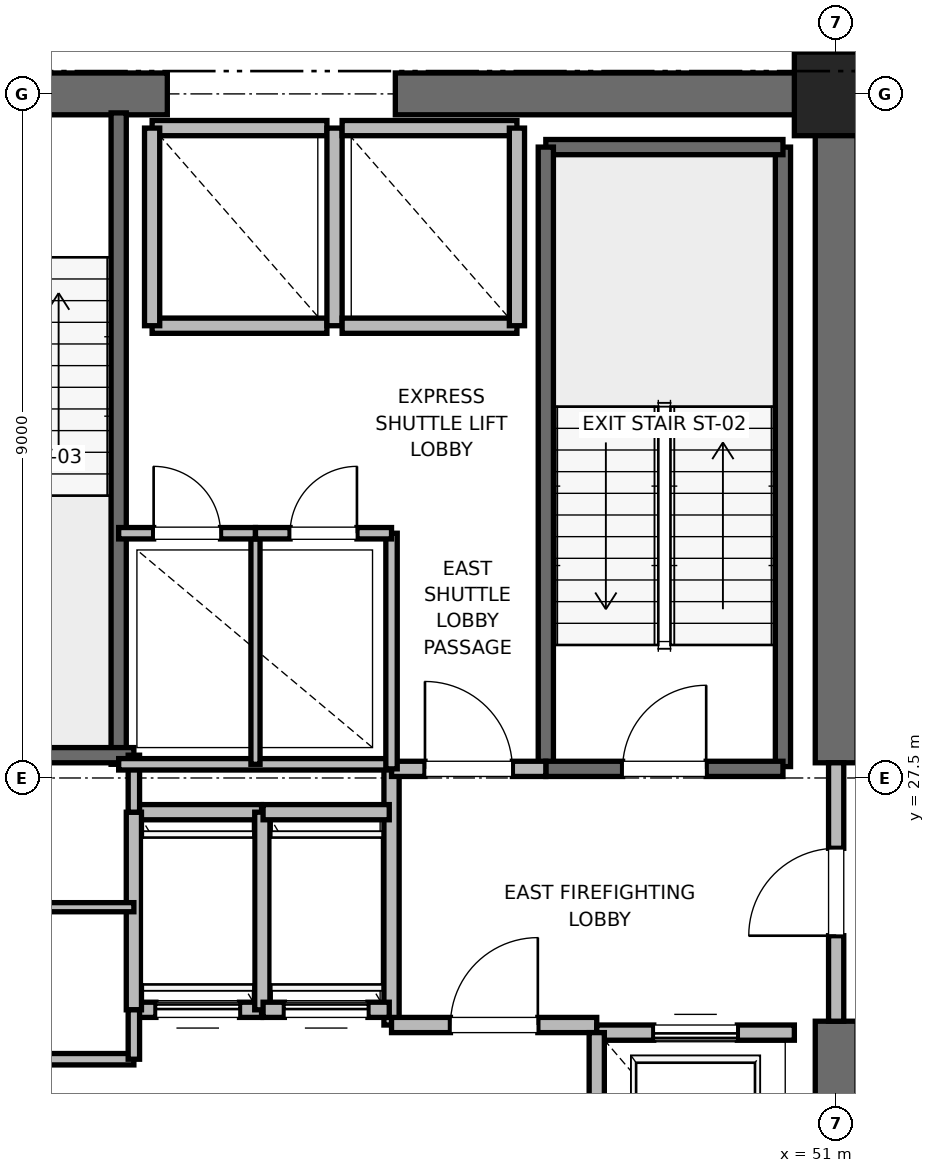
"""IFC4 building model, lengths in metres.
Left out: names, types, materials, properties, quantities, classifications, styles, units other than length and angle.
Written with IfcOpenShell. Run it as: python <this file> out.ifc"""

import sys

from ifc_helpers import new_model, si_unit, direction, frame, frame_2d, origin, origin_2d, place, context, subcontext, project, spatial, rectangle, extrude, element, fill, save


model = new_model("IFC4")
c1 = context("Model", 3, precision=1e-05, world=origin(), true_north=direction((0.0, 1.0)))
c2 = subcontext(c1, "Body", "Model", "MODEL_VIEW")
j1 = project(units=[si_unit("LENGTHUNIT", "METRE"), si_unit("PLANEANGLEUNIT", "RADIAN")], contexts=[c1])
p1 = place(None, origin())
s1 = spatial("IfcSite", under=j1, at=p1, CompositionType="ELEMENT")
p2 = place(p1, origin())
s2 = spatial("IfcBuilding", under=s1, at=p2, CompositionType="ELEMENT")
p3 = place(p2, frame((0.0, 0.0, 180.4)))
s3 = spatial("IfcBuildingStorey", under=s2, at=p3, CompositionType="ELEMENT", Elevation=180.4)
p4 = place(p3, frame((51.0, 36.5, 0.0), z_axis=(0.0, 0.0, 1.0), x_axis=(1.0, 0.0, 0.0)))
e1 = element("IfcColumn", 1, at=p4, inside=s3, PredefinedType="PILASTER", context=c2, shape_type="SweptSolid", body=[
    extrude(rectangle(XDim=1.1, YDim=1.1, at=origin_2d()), origin(), (0.0, 0.0, 1.0), 4.0),
])
p5 = place(p3, frame((37.8, 36.5, 0.0), z_axis=(0.0, 0.0, 1.0), x_axis=(1.0, 0.0, 0.0)))
e2 = element("IfcWall", 2, at=p5, inside=s3, PredefinedType="SHEAR", context=c2, shape_type="SweptSolid", body=[
    extrude(rectangle(XDim=4.4, YDim=0.55, at=frame_2d((2.2, 0.0))), origin(), (0.0, 0.0, 1.0), 3.7),
])
p6 = place(p5, frame((1.65, 0.0, 0.0)))
e3 = element("IfcOpeningElement", 3, at=p6, cuts=e2, PredefinedType="OPENING", context=c2, shape_type="SweptSolid", body=[
    extrude(rectangle(XDim=1.1, YDim=2.15, at=frame_2d((0.55, 1.075))), frame((0.0, 0.275, 0.0), z_axis=(0.0, -1.0, 0.0), x_axis=(1.0, 0.0, 0.0)), (0.0, 0.0, 1.0), 0.55),
])
for number, where, z_axis, x_axis in (
    (4, (45.2, 36.5, 0.0), (0.0, 0.0, 1.0), (1.0, 0.0, 0.0)),
    (5, (51.0, 18.5, 0.0), (0.0, 0.0, 1.0), (0.0, 1.0, 0.0)),
):
    element("IfcWall", number, at=place(p3, frame(where, z_axis=z_axis, x_axis=x_axis)), inside=s3, PredefinedType="SHEAR", context=c2, shape_type="SweptSolid", body=[
        extrude(rectangle(XDim=5.8, YDim=0.55, at=frame_2d((2.9, 0.0))), origin(), (0.0, 0.0, 1.0), 3.7),
    ])
p7 = place(p3, frame((51.0, 27.7, 0.0), z_axis=(0.0, 0.0, 1.0), x_axis=(0.0, 1.0, 0.0)))
e6 = element("IfcWall", 6, at=p7, inside=s3, PredefinedType="SHEAR", context=c2, shape_type="SweptSolid", body=[
    extrude(rectangle(XDim=8.8, YDim=0.55, at=frame_2d((4.4, 0.0))), origin(), (0.0, 0.0, 1.0), 3.7),
])
p8 = place(p3, frame((50.3, 27.65, 0.0), z_axis=(0.0, 0.0, 1.0), x_axis=(0.0, 1.0, 0.0)))
e7 = element("IfcWall", 7, at=p8, inside=s3, PredefinedType="SOLIDWALL", context=c2, shape_type="SweptSolid", body=[
    extrude(rectangle(XDim=8.15, YDim=0.2, at=frame_2d((4.075, 0.0))), origin(), (0.0, 0.0, 1.0), 3.7),
])
p9 = place(p3, frame((47.18, 35.8, 0.0), z_axis=(0.0, 0.0, 1.0), x_axis=(1.0, 0.0, 0.0)))
e8 = element("IfcWall", 8, at=p9, inside=s3, PredefinedType="SOLIDWALL", context=c2, shape_type="SweptSolid", body=[
    extrude(rectangle(XDim=3.12, YDim=0.2, at=frame_2d((1.56, 0.0))), origin(), (0.0, 0.0, 1.0), 3.7),
])
p10 = place(p3, frame((47.18, 27.62, 0.0), z_axis=(0.0, 0.0, 1.0), x_axis=(0.0, 1.0, 0.0)))
e9 = element("IfcWall", 9, at=p10, inside=s3, PredefinedType="SOLIDWALL", context=c2, shape_type="SweptSolid", body=[
    extrude(rectangle(XDim=8.18, YDim=0.2, at=frame_2d((4.09, 0.0))), origin(), (0.0, 0.0, 1.0), 3.7),
])
p11 = place(p3, frame((47.18, 27.62, 0.0), z_axis=(0.0, 0.0, 1.0), x_axis=(1.0, 0.0, 0.0)))
e10 = element("IfcWall", 10, at=p11, inside=s3, PredefinedType="SOLIDWALL", context=c2, shape_type="SweptSolid", body=[
    extrude(rectangle(XDim=3.12, YDim=0.2, at=frame_2d((1.56, 0.0))), origin(), (0.0, 0.0, 1.0), 3.7),
])
p12 = place(p11, frame((1.01, 0.0, 0.0)))
e11 = element("IfcOpeningElement", 11, at=p12, cuts=e10, PredefinedType="OPENING", context=c2, shape_type="SweptSolid", body=[
    extrude(rectangle(XDim=1.1, YDim=2.15, at=frame_2d((0.55, 1.075))), frame((0.0, 0.1, 0.0), z_axis=(0.0, -1.0, 0.0), x_axis=(1.0, 0.0, 0.0)), (0.0, 0.0, 1.0), 0.2),
])
p13 = place(p3, frame((41.56, 27.68, 0.0), z_axis=(0.0, 0.0, 1.0), x_axis=(0.0, 1.0, 0.0)))
e12 = element("IfcWall", 12, at=p13, inside=s3, PredefinedType="SOLIDWALL", context=c2, shape_type="SweptSolid", body=[
    extrude(rectangle(XDim=8.57, YDim=0.2, at=frame_2d((4.285, 0.0))), origin(), (0.0, 0.0, 1.0), 3.7),
])
p14 = place(p3, frame((38.44, 27.8, 0.0), z_axis=(0.0, 0.0, 1.0), x_axis=(1.0, 0.0, 0.0)))
e13 = element("IfcWall", 13, at=p14, inside=s3, PredefinedType="SOLIDWALL", context=c2, shape_type="SweptSolid", body=[
    extrude(rectangle(XDim=3.32, YDim=0.2, at=frame_2d((1.66, 0.0))), origin(), (0.0, 0.0, 1.0), 3.7),
])
p15 = place(p3, frame((45.15, 24.25, 0.0), z_axis=(0.0, 0.0, 1.0), x_axis=(0.0, 1.0, 0.0)))
e14 = element("IfcWall", 14, at=p15, inside=s3, PredefinedType="PARTITIONING", context=c2, shape_type="SweptSolid", body=[
    extrude(rectangle(XDim=3.37, YDim=0.2, at=frame_2d((1.685, 0.0))), origin(), (0.0, 0.0, 1.0), 3.7),
])
p16 = place(p3, frame((45.15, 24.25, 0.0), z_axis=(0.0, 0.0, 1.0), x_axis=(1.0, 0.0, 0.0)))
e15 = element("IfcWall", 15, at=p16, inside=s3, PredefinedType="PARTITIONING", context=c2, shape_type="SweptSolid", body=[
    extrude(rectangle(XDim=2.7, YDim=0.2, at=frame_2d((1.35, 0.0))), origin(), (0.0, 0.0, 1.0), 3.7),
])
p17 = place(p16, frame((0.775, 0.0, 0.0)))
e16 = element("IfcOpeningElement", 16, at=p17, cuts=e15, PredefinedType="OPENING", context=c2, shape_type="SweptSolid", body=[
    extrude(rectangle(XDim=1.15, YDim=2.2, at=frame_2d((0.575, 1.1))), frame((0.0, 0.1, 0.0), z_axis=(0.0, -1.0, 0.0), x_axis=(1.0, 0.0, 0.0)), (0.0, 0.0, 1.0), 0.2),
])
p18 = place(p3, frame((45.15, 27.62, 0.0), z_axis=(0.0, 0.0, 1.0), x_axis=(1.0, 0.0, 0.0)))
e17 = element("IfcWall", 17, at=p18, inside=s3, PredefinedType="PARTITIONING", context=c2, shape_type="SweptSolid", body=[
    extrude(rectangle(XDim=2.03, YDim=0.2, at=frame_2d((1.015, 0.0))), origin(), (0.0, 0.0, 1.0), 3.7),
])
p19 = place(p18, frame((0.44, 0.0, 0.0)))
e18 = element("IfcOpeningElement", 18, at=p19, cuts=e17, PredefinedType="OPENING", context=c2, shape_type="SweptSolid", body=[
    extrude(rectangle(XDim=1.15, YDim=2.2, at=frame_2d((0.575, 1.1))), frame((0.0, 0.1, 0.0), z_axis=(0.0, -1.0, 0.0), x_axis=(1.0, 0.0, 0.0)), (0.0, 0.0, 1.0), 0.2),
])
p20 = place(p3, frame((51.0, 24.3, 0.0), z_axis=(0.0, 0.0, 1.0), x_axis=(0.0, 1.0, 0.0)))
e19 = element("IfcWall", 19, at=p20, inside=s3, PredefinedType="PARTITIONING", context=c2, shape_type="SweptSolid", body=[
    extrude(rectangle(XDim=3.4, YDim=0.2, at=frame_2d((1.7, 0.0))), origin(), (0.0, 0.0, 1.0), 2.68),
])
p21 = place(p20, frame((1.125, 0.0, 0.0)))
e20 = element("IfcOpeningElement", 20, at=p21, cuts=e19, PredefinedType="OPENING", context=c2, shape_type="SweptSolid", body=[
    extrude(rectangle(XDim=1.15, YDim=2.2, at=frame_2d((0.575, 1.1))), frame((0.0, 0.1, 0.0), z_axis=(0.0, -1.0, 0.0), x_axis=(1.0, 0.0, 0.0)), (0.0, 0.0, 1.0), 0.2),
])
p22 = place(p3, frame((50.45, 24.15, 0.0), z_axis=(0.0, 0.0, 1.0), x_axis=(-1.0, 0.0, 0.0)))
e21 = element("IfcWall", 21, at=p22, inside=s3, PredefinedType="SOLIDWALL", context=c2, shape_type="SweptSolid", body=[
    extrude(rectangle(XDim=2.6, YDim=0.2, at=frame_2d((1.3, 0.0))), origin(), (0.0, 0.0, 1.0), 2.68),
])
p23 = place(p22, frame((0.75, 0.0, 0.0)))
e22 = element("IfcOpeningElement", 22, at=p23, cuts=e21, PredefinedType="OPENING", context=c2, shape_type="SweptSolid", body=[
    extrude(rectangle(XDim=1.1, YDim=2.2, at=frame_2d((0.55, 1.1))), frame((0.0, 0.1, 0.0), z_axis=(0.0, -1.0, 0.0), x_axis=(1.0, 0.0, 0.0)), (0.0, 0.0, 1.0), 0.2),
])
p24 = place(p3, frame((47.85, 24.15, 0.0), z_axis=(0.0, 0.0, 1.0), x_axis=(0.0, -1.0, 0.0)))
e23 = element("IfcWall", 23, at=p24, inside=s3, PredefinedType="SOLIDWALL", context=c2, shape_type="SweptSolid", body=[
    extrude(rectangle(XDim=3.0, YDim=0.2, at=frame_2d((1.5, 0.0))), origin(), (0.0, 0.0, 1.0), 3.7),
])
p25 = place(p3, frame((41.76, 24.45, 0.0), z_axis=(0.0, 0.0, 1.0), x_axis=(1.0, 0.0, 0.0)))
e24 = element("IfcWall", 24, at=p25, inside=s3, PredefinedType="SOLIDWALL", context=c2, shape_type="SweptSolid", body=[
    extrude(rectangle(XDim=1.68, YDim=0.2, at=frame_2d((0.84, 0.0))), origin(), (0.0, 0.0, 1.0), 3.7),
])
p26 = place(p25, frame((0.29, 0.0, 0.0)))
e25 = element("IfcOpeningElement", 25, at=p26, cuts=e24, PredefinedType="OPENING", context=c2, shape_type="SweptSolid", body=[
    extrude(rectangle(XDim=1.1, YDim=2.2, at=frame_2d((0.55, 1.1))), frame((0.0, 0.1, 0.0), z_axis=(0.0, -1.0, 0.0), x_axis=(1.0, 0.0, 0.0)), (0.0, 0.0, 1.0), 0.2),
])
p27 = place(p3, frame((43.44, 27.05, 0.0), z_axis=(0.0, 0.0, 1.0), x_axis=(-1.0, 0.0, 0.0)))
e26 = element("IfcWall", 26, at=p27, inside=s3, PredefinedType="SOLIDWALL", context=c2, shape_type="SweptSolid", body=[
    extrude(rectangle(XDim=1.68, YDim=0.2, at=frame_2d((0.84, 0.0))), origin(), (0.0, 0.0, 1.0), 3.7),
])
for number, where, z_axis, x_axis in (
    (27, (41.76, 27.05, 0.0), (0.0, 0.0, 1.0), (0.0, -1.0, 0.0)),
    (28, (43.45, 24.45, 0.0), (0.0, 0.0, 1.0), (0.0, 1.0, 0.0)),
):
    element("IfcWall", number, at=place(p3, frame(where, z_axis=z_axis, x_axis=x_axis)), inside=s3, PredefinedType="SOLIDWALL", context=c2, shape_type="SweptSolid", body=[
        extrude(rectangle(XDim=2.6, YDim=0.2, at=frame_2d((1.3, 0.0))), origin(), (0.0, 0.0, 1.0), 3.7),
    ])
p28 = place(p3, frame((43.46, 24.45, 0.0), z_axis=(0.0, 0.0, 1.0), x_axis=(1.0, 0.0, 0.0)))
e29 = element("IfcWall", 29, at=p28, inside=s3, PredefinedType="SOLIDWALL", context=c2, shape_type="SweptSolid", body=[
    extrude(rectangle(XDim=1.66, YDim=0.2, at=frame_2d((0.83, 0.0))), origin(), (0.0, 0.0, 1.0), 3.7),
])
p29 = place(p28, frame((0.28, 0.0, 0.0)))
e30 = element("IfcOpeningElement", 30, at=p29, cuts=e29, PredefinedType="OPENING", context=c2, shape_type="SweptSolid", body=[
    extrude(rectangle(XDim=1.1, YDim=2.2, at=frame_2d((0.55, 1.1))), frame((0.0, 0.1, 0.0), z_axis=(0.0, -1.0, 0.0), x_axis=(1.0, 0.0, 0.0)), (0.0, 0.0, 1.0), 0.2),
])
p30 = place(p3, frame((45.12, 27.05, 0.0), z_axis=(0.0, 0.0, 1.0), x_axis=(-1.0, 0.0, 0.0)))
e31 = element("IfcWall", 31, at=p30, inside=s3, PredefinedType="SOLIDWALL", context=c2, shape_type="SweptSolid", body=[
    extrude(rectangle(XDim=1.66, YDim=0.2, at=frame_2d((0.83, 0.0))), origin(), (0.0, 0.0, 1.0), 3.7),
])
p31 = place(p3, frame((42.0, 33.45, 0.0), z_axis=(0.0, 0.0, 1.0), x_axis=(1.0, 0.0, 0.0)))
e32 = element("IfcWall", 32, at=p31, inside=s3, PredefinedType="SOLIDWALL", context=c2, shape_type="SweptSolid", body=[
    extrude(rectangle(XDim=2.3, YDim=0.2, at=frame_2d((1.15, 0.0))), origin(), (0.0, 0.0, 1.0), 3.7),
])
p32 = place(p3, frame((44.3, 36.05, 0.0), z_axis=(0.0, 0.0, 1.0), x_axis=(-1.0, 0.0, 0.0)))
e33 = element("IfcWall", 33, at=p32, inside=s3, PredefinedType="SOLIDWALL", context=c2, shape_type="SweptSolid", body=[
    extrude(rectangle(XDim=2.3, YDim=0.2, at=frame_2d((1.15, 0.0))), origin(), (0.0, 0.0, 1.0), 2.68),
])
for number, where, z_axis, x_axis in (
    (34, (42.0, 36.05, 0.0), (0.0, 0.0, 1.0), (0.0, -1.0, 0.0)),
    (35, (44.4, 33.45, 0.0), (0.0, 0.0, 1.0), (0.0, 1.0, 0.0)),
):
    element("IfcWall", number, at=place(p3, frame(where, z_axis=z_axis, x_axis=x_axis)), inside=s3, PredefinedType="SOLIDWALL", context=c2, shape_type="SweptSolid", body=[
        extrude(rectangle(XDim=2.6, YDim=0.2, at=frame_2d((1.3, 0.0))), origin(), (0.0, 0.0, 1.0), 2.68),
    ])
p33 = place(p3, frame((44.5, 33.45, 0.0), z_axis=(0.0, 0.0, 1.0), x_axis=(1.0, 0.0, 0.0)))
e36 = element("IfcWall", 36, at=p33, inside=s3, PredefinedType="SOLIDWALL", context=c2, shape_type="SweptSolid", body=[
    extrude(rectangle(XDim=2.3, YDim=0.2, at=frame_2d((1.15, 0.0))), origin(), (0.0, 0.0, 1.0), 3.7),
])
p34 = place(p3, frame((46.8, 36.05, 0.0), z_axis=(0.0, 0.0, 1.0), x_axis=(-1.0, 0.0, 0.0)))
e37 = element("IfcWall", 37, at=p34, inside=s3, PredefinedType="SOLIDWALL", context=c2, shape_type="SweptSolid", body=[
    extrude(rectangle(XDim=2.3, YDim=0.2, at=frame_2d((1.15, 0.0))), origin(), (0.0, 0.0, 1.0), 2.68),
])
p35 = place(p3, frame((46.8, 33.45, 0.0), z_axis=(0.0, 0.0, 1.0), x_axis=(0.0, 1.0, 0.0)))
e38 = element("IfcWall", 38, at=p35, inside=s3, PredefinedType="SOLIDWALL", context=c2, shape_type="SweptSolid", body=[
    extrude(rectangle(XDim=2.6, YDim=0.2, at=frame_2d((1.3, 0.0))), origin(), (0.0, 0.0, 1.0), 3.7),
])
p36 = place(p3, frame((39.95, 23.8, 0.0), z_axis=(0.0, 0.0, 1.0), x_axis=(1.0, 0.0, 0.0)))
e39 = element("IfcWall", 39, at=p36, inside=s3, PredefinedType="PARTITIONING", context=c2, shape_type="SweptSolid", body=[
    extrude(rectangle(XDim=1.81, YDim=0.15, at=frame_2d((0.905, 0.0))), origin(), (0.0, 0.0, 1.0), 2.85),
])
p37 = place(p3, frame((39.95, 25.8, 0.0), z_axis=(0.0, 0.0, 1.0), x_axis=(1.0, 0.0, 0.0)))
e40 = element("IfcWall", 40, at=p37, inside=s3, PredefinedType="PARTITIONING", context=c2, shape_type="SweptSolid", body=[
    extrude(rectangle(XDim=1.81, YDim=0.12, at=frame_2d((0.905, 0.0))), origin(), (0.0, 0.0, 1.0), 2.85),
])
p38 = place(p3, frame((41.76, 23.8, 0.0), z_axis=(0.0, 0.0, 1.0), x_axis=(0.0, 1.0, 0.0)))
e41 = element("IfcWall", 41, at=p38, inside=s3, PredefinedType="PARTITIONING", context=c2, shape_type="SweptSolid", body=[
    extrude(rectangle(XDim=0.65, YDim=0.15, at=frame_2d((0.325, 0.0))), origin(), (0.0, 0.0, 1.0), 2.85),
])
p39 = place(p3, frame((41.76, 27.05, 0.0), z_axis=(0.0, 0.0, 1.0), x_axis=(0.0, 1.0, 0.0)))
e42 = element("IfcWall", 42, at=p39, inside=s3, PredefinedType="PARTITIONING", context=c2, shape_type="SweptSolid", body=[
    extrude(rectangle(XDim=0.75, YDim=0.15, at=frame_2d((0.375, 0.0))), origin(), (0.0, 0.0, 1.0), 2.85),
])
p40 = place(p3, frame((41.56, 27.68, 0.0), z_axis=(0.0, 0.0, 1.0), x_axis=(1.0, 0.0, 0.0)))
e43 = element("IfcWall", 43, at=p40, inside=s3, PredefinedType="PARTITIONING", context=c2, shape_type="SweptSolid", body=[
    extrude(rectangle(XDim=3.59, YDim=0.15, at=frame_2d((1.795, 0.0))), origin(), (0.0, 0.0, 1.0), 2.85),
])
p41 = place(p3, frame((45.15, 27.62, 0.0), z_axis=(0.0, 0.0, 1.0), x_axis=(0.0, 1.0, 0.0)))
e44 = element("IfcWall", 44, at=p41, inside=s3, PredefinedType="PARTITIONING", context=c2, shape_type="SweptSolid", body=[
    extrude(rectangle(XDim=3.1, YDim=0.15, at=frame_2d((1.55, 0.0))), origin(), (0.0, 0.0, 1.0), 2.85),
])
p42 = place(p3, frame((43.36, 27.68, 0.0), z_axis=(0.0, 0.0, 1.0), x_axis=(0.0, 1.0, 0.0)))
e45 = element("IfcWall", 45, at=p42, inside=s3, PredefinedType="PARTITIONING", context=c2, shape_type="SweptSolid", body=[
    extrude(rectangle(XDim=3.04, YDim=0.12, at=frame_2d((1.52, 0.0))), origin(), (0.0, 0.0, 1.0), 2.85),
])
p43 = place(p3, frame((41.56, 30.72, 0.0), z_axis=(0.0, 0.0, 1.0), x_axis=(1.0, 0.0, 0.0)))
e46 = element("IfcWall", 46, at=p43, inside=s3, PredefinedType="PARTITIONING", context=c2, shape_type="SweptSolid", body=[
    extrude(rectangle(XDim=1.8, YDim=0.15, at=frame_2d((0.9, 0.0))), origin(), (0.0, 0.0, 1.0), 2.85),
])
p44 = place(p43, frame((0.46, 0.0, 0.0)))
e47 = element("IfcOpeningElement", 47, at=p44, cuts=e46, PredefinedType="OPENING", context=c2, shape_type="SweptSolid", body=[
    extrude(rectangle(XDim=0.88, YDim=2.1, at=frame_2d((0.44, 1.05))), frame((0.0, 0.075, 0.0), z_axis=(0.0, -1.0, 0.0), x_axis=(1.0, 0.0, 0.0)), (0.0, 0.0, 1.0), 0.15),
])
p45 = place(p3, frame((43.36, 30.72, 0.0), z_axis=(0.0, 0.0, 1.0), x_axis=(1.0, 0.0, 0.0)))
e48 = element("IfcWall", 48, at=p45, inside=s3, PredefinedType="PARTITIONING", context=c2, shape_type="SweptSolid", body=[
    extrude(rectangle(XDim=1.79, YDim=0.15, at=frame_2d((0.895, 0.0))), origin(), (0.0, 0.0, 1.0), 2.85),
])
p46 = place(p45, frame((0.455, 0.0, 0.0)))
e49 = element("IfcOpeningElement", 49, at=p46, cuts=e48, PredefinedType="OPENING", context=c2, shape_type="SweptSolid", body=[
    extrude(rectangle(XDim=0.88, YDim=2.1, at=frame_2d((0.44, 1.05))), frame((0.0, 0.075, 0.0), z_axis=(0.0, -1.0, 0.0), x_axis=(1.0, 0.0, 0.0)), (0.0, 0.0, 1.0), 0.15),
])
p47 = place(p12, origin())
e50 = element("IfcDoor", 50, at=p47, inside=s3, OperationType="SINGLE_SWING_RIGHT", PredefinedType="DOOR", context=c2, shape_type="SweptSolid", body=[
    extrude(rectangle(XDim=1.1, YDim=2.15, at=frame_2d((0.55, 1.075))), frame((0.0, 0.025, 0.0), z_axis=(0.0, -1.0, 0.0), x_axis=(1.0, 0.0, 0.0)), (0.0, 0.0, 1.0), 0.05),
])
fill(e11, e50)
p48 = place(p17, origin())
e51 = element("IfcDoor", 51, at=p48, inside=s3, OperationType="SINGLE_SWING_RIGHT", PredefinedType="DOOR", context=c2, shape_type="SweptSolid", body=[
    extrude(rectangle(XDim=1.15, YDim=2.2, at=frame_2d((0.575, 1.1))), frame((0.0, 0.025, 0.0), z_axis=(0.0, -1.0, 0.0), x_axis=(1.0, 0.0, 0.0)), (0.0, 0.0, 1.0), 0.05),
])
fill(e16, e51)
p49 = place(p19, origin())
e52 = element("IfcDoor", 52, at=p49, inside=s3, OperationType="SINGLE_SWING_LEFT", PredefinedType="DOOR", context=c2, shape_type="SweptSolid", body=[
    extrude(rectangle(XDim=1.15, YDim=2.2, at=frame_2d((0.575, 1.1))), frame((0.0, 0.025, 0.0), z_axis=(0.0, -1.0, 0.0), x_axis=(1.0, 0.0, 0.0)), (0.0, 0.0, 1.0), 0.05),
])
fill(e18, e52)
p50 = place(p21, origin())
e53 = element("IfcDoor", 53, at=p50, inside=s3, OperationType="SINGLE_SWING_LEFT", PredefinedType="DOOR", context=c2, shape_type="SweptSolid", body=[
    extrude(rectangle(XDim=1.15, YDim=2.2, at=frame_2d((0.575, 1.1))), frame((0.0, 0.025, 0.0), z_axis=(0.0, -1.0, 0.0), x_axis=(1.0, 0.0, 0.0)), (0.0, 0.0, 1.0), 0.05),
])
fill(e20, e53)
p51 = place(p23, origin())
e54 = element("IfcDoor", 54, at=p51, inside=s3, OperationType="SLIDING_TO_RIGHT", PredefinedType="DOOR", context=c2, shape_type="SweptSolid", body=[
    extrude(rectangle(XDim=1.1, YDim=2.2, at=frame_2d((0.55, 1.1))), frame((0.0, 0.025, 0.0), z_axis=(0.0, -1.0, 0.0), x_axis=(1.0, 0.0, 0.0)), (0.0, 0.0, 1.0), 0.05),
])
fill(e22, e54)
p52 = place(p26, origin())
e55 = element("IfcDoor", 55, at=p52, inside=s3, OperationType="SLIDING_TO_RIGHT", PredefinedType="DOOR", context=c2, shape_type="SweptSolid", body=[
    extrude(rectangle(XDim=1.1, YDim=2.2, at=frame_2d((0.55, 1.1))), frame((0.0, 0.025, 0.0), z_axis=(0.0, -1.0, 0.0), x_axis=(1.0, 0.0, 0.0)), (0.0, 0.0, 1.0), 0.05),
])
fill(e25, e55)
p53 = place(p29, origin())
e56 = element("IfcDoor", 56, at=p53, inside=s3, OperationType="SLIDING_TO_RIGHT", PredefinedType="DOOR", context=c2, shape_type="SweptSolid", body=[
    extrude(rectangle(XDim=1.1, YDim=2.2, at=frame_2d((0.55, 1.1))), frame((0.0, 0.025, 0.0), z_axis=(0.0, -1.0, 0.0), x_axis=(1.0, 0.0, 0.0)), (0.0, 0.0, 1.0), 0.05),
])
fill(e30, e56)
p54 = place(p44, origin())
e57 = element("IfcDoor", 57, at=p54, inside=s3, OperationType="SINGLE_SWING_LEFT", PredefinedType="DOOR", context=c2, shape_type="SweptSolid", body=[
    extrude(rectangle(XDim=0.88, YDim=2.1, at=frame_2d((0.44, 1.05))), frame((0.0, 0.025, 0.0), z_axis=(0.0, -1.0, 0.0), x_axis=(1.0, 0.0, 0.0)), (0.0, 0.0, 1.0), 0.05),
])
fill(e47, e57)
p55 = place(p46, origin())
e58 = element("IfcDoor", 58, at=p55, inside=s3, OperationType="SINGLE_SWING_RIGHT", PredefinedType="DOOR", context=c2, shape_type="SweptSolid", body=[
    extrude(rectangle(XDim=0.88, YDim=2.1, at=frame_2d((0.44, 1.05))), frame((0.0, 0.025, 0.0), z_axis=(0.0, -1.0, 0.0), x_axis=(1.0, 0.0, 0.0)), (0.0, 0.0, 1.0), 0.05),
])
fill(e49, e58)
save(model, sys.argv[1])
